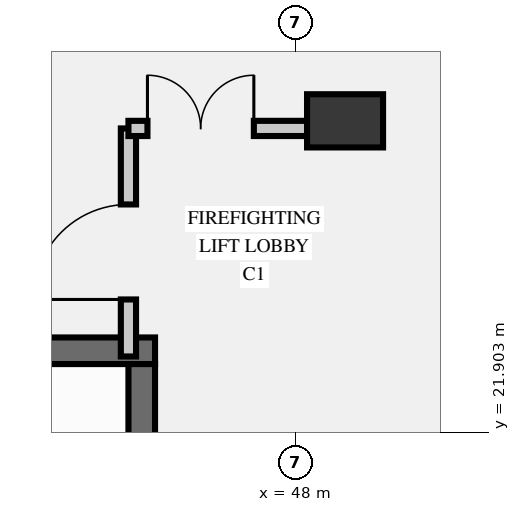
"""IFC4 building model, lengths in metres.
Left out: names, types, materials, properties, quantities, classifications, styles, units other than length and angle.
Written with IfcOpenShell. Run it as: python <this file> out.ifc"""

import sys

from ifc_helpers import new_model, si_unit, direction, frame, frame_2d, origin, origin_2d, place, context, subcontext, project, spatial, rectangle, extrude, element, fill, save


model = new_model("IFC4")
c1 = context("Model", 3, precision=1e-05, world=origin(), true_north=direction((0.0, 1.0)))
c2 = subcontext(c1, "Body", "Model", "MODEL_VIEW")
j1 = project(units=[si_unit("LENGTHUNIT", "METRE"), si_unit("PLANEANGLEUNIT", "RADIAN")], contexts=[c1])
p1 = place(None, origin())
s1 = spatial("IfcSite", under=j1, at=p1, CompositionType="ELEMENT")
p2 = place(p1, origin())
s2 = spatial("IfcBuilding", under=s1, at=p2, CompositionType="ELEMENT")
p3 = place(p2, frame((0.0, 0.0, -8.4)))
s3 = spatial("IfcBuildingStorey", under=s2, at=p3, CompositionType="ELEMENT", Elevation=-8.4)
p4 = place(p3, frame((37.85, 22.975, 0.0), z_axis=(0.0, 0.0, 1.0), x_axis=(1.0, 0.0, 0.0)))
e1 = element("IfcWall", 1, at=p4, inside=s3, PredefinedType="SHEAR", context=c2, shape_type="SweptSolid", body=[
    extrude(rectangle(XDim=8.3, YDim=0.35, at=frame_2d((4.15, 0.0))), origin(), (0.0, 0.0, 1.0), 3.92),
])
p5 = place(p3, frame((45.975, 16.0, 0.0), z_axis=(0.0, 0.0, 1.0), x_axis=(0.0, 1.0, 0.0)))
e2 = element("IfcWall", 2, at=p5, inside=s3, PredefinedType="SHEAR", context=c2, shape_type="SweptSolid", body=[
    extrude(rectangle(XDim=6.8, YDim=0.35, at=frame_2d((3.4, 0.0))), origin(), (0.0, 0.0, 1.0), 3.92),
])
p6 = place(p3, frame((48.65, 26.0, -0.44), z_axis=(0.0, 0.0, 1.0), x_axis=(0.0, 1.0, 0.0)))
e3 = element("IfcColumn", 3, at=p6, inside=s3, PredefinedType="COLUMN", context=c2, shape_type="SweptSolid", body=[
    extrude(rectangle(XDim=0.7, YDim=1.0, at=origin_2d()), origin(), (0.0, 0.0, 1.0), 4.64),
])
p7 = place(p3, frame((45.8, 22.9, 0.0), z_axis=(0.0, 0.0, 1.0), x_axis=(0.0, 1.0, 0.0)))
e4 = element("IfcWall", 4, at=p7, inside=s3, PredefinedType="PARTITIONING", context=c2, shape_type="SweptSolid", body=[
    extrude(rectangle(XDim=3.0, YDim=0.2, at=frame_2d((1.5, 0.0))), origin(), (0.0, 0.0, 1.0), 3.9),
])
p8 = place(p7, frame((0.75, 0.0, 0.0)))
e5 = element("IfcOpeningElement", 5, at=p8, cuts=e4, PredefinedType="OPENING", context=c2, shape_type="SweptSolid", body=[
    extrude(rectangle(XDim=1.25, YDim=2.2, at=frame_2d((0.625, 1.1))), frame((0.0, 0.11, 0.0), z_axis=(0.0, -1.0, 0.0), x_axis=(1.0, 0.0, 0.0)), (0.0, 0.0, 1.0), 0.22),
])
p9 = place(p3, frame((45.8, 25.9, 0.0), z_axis=(0.0, 0.0, 1.0), x_axis=(1.0, 0.0, 0.0)))
e6 = element("IfcWall", 6, at=p9, inside=s3, PredefinedType="PARTITIONING", context=c2, shape_type="SweptSolid", body=[
    extrude(rectangle(XDim=2.85, YDim=0.2, at=frame_2d((1.425, 0.0))), origin(), (0.0, 0.0, 1.0), 3.9),
])
p10 = place(p9, frame((0.25, 0.0, 0.0)))
e7 = element("IfcOpeningElement", 7, at=p10, cuts=e6, PredefinedType="OPENING", context=c2, shape_type="SweptSolid", body=[
    extrude(rectangle(XDim=1.4, YDim=2.25, at=frame_2d((0.7, 1.125))), frame((0.0, 0.11, 0.0), z_axis=(0.0, -1.0, 0.0), x_axis=(1.0, 0.0, 0.0)), (0.0, 0.0, 1.0), 0.22),
])
p11 = place(p10, origin())
e8 = element("IfcDoor", 8, at=p11, inside=s3, OperationType="DOUBLE_DOOR_SINGLE_SWING", PredefinedType="DOOR", context=c2, shape_type="SweptSolid", body=[
    extrude(rectangle(XDim=1.4, YDim=2.25, at=frame_2d((0.7, 1.125))), frame((0.0, 0.025, 0.0), z_axis=(0.0, -1.0, 0.0), x_axis=(1.0, 0.0, 0.0)), (0.0, 0.0, 1.0), 0.05),
])
fill(e7, e8)
p12 = place(p8, origin())
e9 = element("IfcDoor", 9, at=p12, inside=s3, OperationType="SINGLE_SWING_LEFT", PredefinedType="DOOR", context=c2, shape_type="SweptSolid", body=[
    extrude(rectangle(XDim=1.25, YDim=2.2, at=frame_2d((0.625, 1.1))), frame((0.0, 0.025, 0.0), z_axis=(0.0, -1.0, 0.0), x_axis=(1.0, 0.0, 0.0)), (0.0, 0.0, 1.0), 0.05),
])
fill(e5, e9)
save(model, sys.argv[1])
